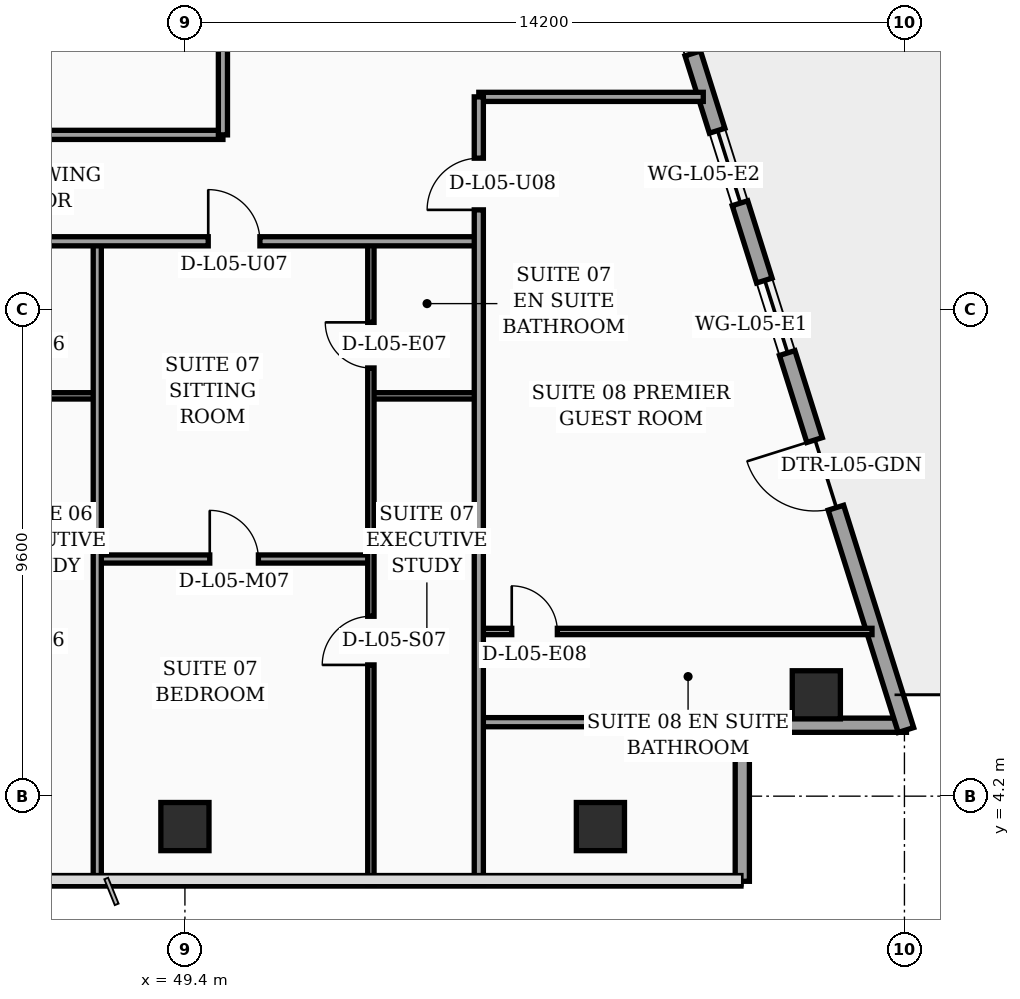
"""IFC4 building model, lengths in metres.
Left out: names, types, materials, properties, quantities, classifications, styles, units other than length and angle.
Written with IfcOpenShell. Run it as: python <this file> out.ifc"""

import sys

from ifc_helpers import new_model, si_unit, direction, frame, frame_2d, origin, origin_2d, place, context, subcontext, project, spatial, rectangle, hollow_rectangle, extrude, element, fill, save


model = new_model("IFC4")
c1 = context("Model", 3, precision=1e-05, world=origin(), true_north=direction((0.0, 1.0)))
c2 = subcontext(c1, "Body", "Model", "MODEL_VIEW")
j1 = project(units=[si_unit("LENGTHUNIT", "METRE"), si_unit("PLANEANGLEUNIT", "RADIAN")], contexts=[c1])
p1 = place(None, origin())
s1 = spatial("IfcSite", under=j1, at=p1, CompositionType="ELEMENT")
p2 = place(p1, origin())
s2 = spatial("IfcBuilding", under=s1, at=p2, CompositionType="ELEMENT")
p3 = place(p2, frame((0.0, 0.0, 27.0)))
s3 = spatial("IfcBuildingStorey", under=s2, at=p3, CompositionType="ELEMENT", Elevation=27.0)
for number, where, z_axis, x_axis in (
    (1, (49.4, 3.6, 0.0), (0.0, 0.0, 1.0), (1.0, 0.0, 0.0)),
    (2, (57.6, 3.6, 0.0), (0.0, 0.0, 1.0), (1.0, 0.0, 0.0)),
    (3, (61.861, 6.2, 0.0), (0.0, 0.0, 1.0), (1.0, 0.0, 0.0)),
):
    element("IfcColumn", number, at=place(p3, frame(where, z_axis=z_axis, x_axis=x_axis)), inside=s3, PredefinedType="COLUMN", context=c2, shape_type="SweptSolid", body=[
        extrude(hollow_rectangle(XDim=0.95, YDim=0.95, WallThickness=0.04, at=origin_2d()), origin(), (0.0, 0.0, 1.0), 3.56),
    ])
p4 = place(p3, frame((60.4, 2.52, 0.0), z_axis=(0.0, 0.0, 1.0), x_axis=(0.0, 1.0, 0.0)))
e4 = element("IfcWall", 4, at=p4, inside=s3, PredefinedType="SOLIDWALL", context=c2, shape_type="SweptSolid", body=[
    extrude(rectangle(XDim=2.94, YDim=0.28, at=frame_2d((1.47, 0.0))), origin(), (0.0, 0.0, 1.0), 3.04),
])
p5 = place(p3, frame((60.26, 5.6, 0.0), z_axis=(0.0, 0.0, 1.0), x_axis=(1.0, 0.0, 0.0)))
e5 = element("IfcWall", 5, at=p5, inside=s3, PredefinedType="SOLIDWALL", context=c2, shape_type="SweptSolid", body=[
    extrude(rectangle(XDim=3.38, YDim=0.28, at=frame_2d((1.69, 0.0))), origin(), (0.0, 0.0, 1.0), 3.04),
])
p6 = place(p3, frame((63.63, 5.505, 0.0), z_axis=(0.0, 0.0, 1.0), x_axis=(-0.300501856448, 0.953781229775, 0.0)))
e6 = element("IfcWall", 6, at=p6, inside=s3, PredefinedType="SOLIDWALL", context=c2, shape_type="SweptSolid", body=[
    extrude(rectangle(XDim=30.814, YDim=0.32, at=frame_2d((15.407, 0.0))), origin(), (0.0, 0.0, 1.0), 3.56),
])
p7 = place(p6, frame((4.6, 0.0, 0.0)))
e7 = element("IfcOpeningElement", 7, at=p7, cuts=e6, PredefinedType="OPENING", context=c2, shape_type="SweptSolid", body=[
    extrude(rectangle(XDim=1.4, YDim=2.25, at=frame_2d((0.7, 1.125))), frame((0.0, 0.17, 0.0), z_axis=(0.0, -1.0, 0.0), x_axis=(1.0, 0.0, 0.0)), (0.0, 0.0, 1.0), 0.34),
])
p8 = place(p6, frame((7.8, 0.0, 0.75)))
e8 = element("IfcOpeningElement", 8, at=p8, cuts=e6, PredefinedType="OPENING", context=c2, shape_type="SweptSolid", body=[
    extrude(rectangle(XDim=1.5, YDim=1.6, at=frame_2d((0.75, 0.8))), frame((0.0, 0.17, 0.0), z_axis=(0.0, -1.0, 0.0), x_axis=(1.0, 0.0, 0.0)), (0.0, 0.0, 1.0), 0.34),
])
p9 = place(p6, frame((10.9, 0.0, 0.75)))
e9 = element("IfcOpeningElement", 9, at=p9, cuts=e6, PredefinedType="OPENING", context=c2, shape_type="SweptSolid", body=[
    extrude(rectangle(XDim=1.5, YDim=1.6, at=frame_2d((0.75, 0.8))), frame((0.0, 0.17, 0.0), z_axis=(0.0, -1.0, 0.0), x_axis=(1.0, 0.0, 0.0)), (0.0, 0.0, 1.0), 0.34),
])
p10 = place(p6, frame((14.0, 0.0, 0.75)))
e10 = element("IfcOpeningElement", 10, at=p10, cuts=e6, PredefinedType="OPENING", context=c2, shape_type="SweptSolid", body=[
    extrude(rectangle(XDim=1.5, YDim=1.6, at=frame_2d((0.75, 0.8))), frame((0.0, 0.17, 0.0), z_axis=(0.0, -1.0, 0.0), x_axis=(1.0, 0.0, 0.0)), (0.0, 0.0, 1.0), 0.34),
])
p11 = place(p6, frame((17.1, 0.0, 0.75)))
e11 = element("IfcOpeningElement", 11, at=p11, cuts=e6, PredefinedType="OPENING", context=c2, shape_type="SweptSolid", body=[
    extrude(rectangle(XDim=1.5, YDim=1.6, at=frame_2d((0.75, 0.8))), frame((0.0, 0.17, 0.0), z_axis=(0.0, -1.0, 0.0), x_axis=(1.0, 0.0, 0.0)), (0.0, 0.0, 1.0), 0.34),
])
p12 = place(p6, frame((20.2, 0.0, 0.75)))
e12 = element("IfcOpeningElement", 12, at=p12, cuts=e6, PredefinedType="OPENING", context=c2, shape_type="SweptSolid", body=[
    extrude(rectangle(XDim=1.5, YDim=1.6, at=frame_2d((0.75, 0.8))), frame((0.0, 0.17, 0.0), z_axis=(0.0, -1.0, 0.0), x_axis=(1.0, 0.0, 0.0)), (0.0, 0.0, 1.0), 0.34),
])
p13 = place(p6, frame((23.3, 0.0, 0.75)))
e13 = element("IfcOpeningElement", 13, at=p13, cuts=e6, PredefinedType="OPENING", context=c2, shape_type="SweptSolid", body=[
    extrude(rectangle(XDim=1.5, YDim=1.6, at=frame_2d((0.75, 0.8))), frame((0.0, 0.17, 0.0), z_axis=(0.0, -1.0, 0.0), x_axis=(1.0, 0.0, 0.0)), (0.0, 0.0, 1.0), 0.34),
])
p14 = place(p6, frame((26.4, 0.0, 0.75)))
e14 = element("IfcOpeningElement", 14, at=p14, cuts=e6, PredefinedType="OPENING", context=c2, shape_type="SweptSolid", body=[
    extrude(rectangle(XDim=1.5, YDim=1.6, at=frame_2d((0.75, 0.8))), frame((0.0, 0.17, 0.0), z_axis=(0.0, -1.0, 0.0), x_axis=(1.0, 0.0, 0.0)), (0.0, 0.0, 1.0), 0.34),
])
p15 = place(p3, frame((45.54, 12.1, 0.0), z_axis=(0.0, 0.0, 1.0), x_axis=(1.0, 0.0, 0.0)))
e15 = element("IfcWall", 15, at=p15, inside=s3, PredefinedType="PARTITIONING", context=c2, shape_type="SweptSolid", body=[
    extrude(rectangle(XDim=2.13, YDim=0.125, at=frame_2d((1.065, 0.0))), origin(), (0.0, 0.0, 1.0), 2.84),
])
p16 = place(p3, frame((53.07, 12.1, 0.0), z_axis=(0.0, 0.0, 1.0), x_axis=(1.0, 0.0, 0.0)))
e16 = element("IfcWall", 16, at=p16, inside=s3, PredefinedType="PARTITIONING", context=c2, shape_type="SweptSolid", body=[
    extrude(rectangle(XDim=2.13, YDim=0.125, at=frame_2d((1.065, 0.0))), origin(), (0.0, 0.0, 1.0), 3.56),
])
p17 = place(p3, frame((47.67, 8.88, 0.0), z_axis=(0.0, 0.0, 1.0), x_axis=(1.0, 0.0, 0.0)))
e17 = element("IfcWall", 17, at=p17, inside=s3, PredefinedType="PARTITIONING", context=c2, shape_type="SweptSolid", body=[
    extrude(rectangle(XDim=5.4, YDim=0.16, at=frame_2d((2.7, 0.0))), origin(), (0.0, 0.0, 1.0), 2.84),
])
p18 = place(p17, frame((2.22, 0.0, 0.0)))
e18 = element("IfcOpeningElement", 18, at=p18, cuts=e17, PredefinedType="OPENING", context=c2, shape_type="SweptSolid", body=[
    extrude(rectangle(XDim=0.96, YDim=2.2, at=frame_2d((0.48, 1.1))), frame((0.0, 0.09, 0.0), z_axis=(0.0, -1.0, 0.0), x_axis=(1.0, 0.0, 0.0)), (0.0, 0.0, 1.0), 0.18),
])
p19 = place(p3, frame((53.07, 2.44, 0.0), z_axis=(0.0, 0.0, 1.0), x_axis=(0.0, 1.0, 0.0)))
e19 = element("IfcWall", 19, at=p19, inside=s3, PredefinedType="PARTITIONING", context=c2, shape_type="SweptSolid", body=[
    extrude(rectangle(XDim=12.71, YDim=0.125, at=frame_2d((6.355, 0.0))), origin(), (0.0, 0.0, 1.0), 3.04),
])
p20 = place(p19, frame((4.35, 0.0, 0.0)))
e20 = element("IfcOpeningElement", 20, at=p20, cuts=e19, PredefinedType="OPENING", context=c2, shape_type="SweptSolid", body=[
    extrude(rectangle(XDim=0.96, YDim=2.2, at=frame_2d((0.48, 1.1))), frame((0.0, 0.073, 0.0), z_axis=(0.0, -1.0, 0.0), x_axis=(1.0, 0.0, 0.0)), (0.0, 0.0, 1.0), 0.145),
])
p21 = place(p19, frame((10.21, 0.0, 0.0)))
e21 = element("IfcOpeningElement", 21, at=p21, cuts=e19, PredefinedType="OPENING", context=c2, shape_type="SweptSolid", body=[
    extrude(rectangle(XDim=0.9, YDim=2.15, at=frame_2d((0.45, 1.075))), frame((0.0, 0.073, 0.0), z_axis=(0.0, -1.0, 0.0), x_axis=(1.0, 0.0, 0.0)), (0.0, 0.0, 1.0), 0.145),
])
p22 = place(p3, frame((47.67, 2.44, 0.0), z_axis=(0.0, 0.0, 1.0), x_axis=(0.0, 1.0, 0.0)))
e22 = element("IfcWall", 22, at=p22, inside=s3, PredefinedType="PARTITIONING", context=c2, shape_type="SweptSolid", body=[
    extrude(rectangle(XDim=12.71, YDim=0.16, at=frame_2d((6.355, 0.0))), origin(), (0.0, 0.0, 1.0), 2.84),
])
p23 = place(p3, frame((32.4, 15.15, 0.0), z_axis=(0.0, 0.0, 1.0), x_axis=(1.0, 0.0, 0.0)))
e23 = element("IfcWall", 23, at=p23, inside=s3, PredefinedType="PARTITIONING", context=c2, shape_type="SweptSolid", body=[
    extrude(rectangle(XDim=22.8, YDim=0.18, at=frame_2d((11.4, 0.0))), origin(), (0.0, 0.0, 1.0), 2.84),
])
p24 = place(p23, frame((2.07, 0.0, 0.0)))
e24 = element("IfcOpeningElement", 24, at=p24, cuts=e23, PredefinedType="OPENING", context=c2, shape_type="SweptSolid", body=[
    extrude(rectangle(XDim=1.02, YDim=2.2, at=frame_2d((0.51, 1.1))), frame((0.0, 0.1, 0.0), z_axis=(0.0, -1.0, 0.0), x_axis=(1.0, 0.0, 0.0)), (0.0, 0.0, 1.0), 0.2),
])
p25 = place(p23, frame((9.5, 0.0, 0.0)))
e25 = element("IfcOpeningElement", 25, at=p25, cuts=e23, PredefinedType="OPENING", context=c2, shape_type="SweptSolid", body=[
    extrude(rectangle(XDim=1.02, YDim=2.2, at=frame_2d((0.51, 1.1))), frame((0.0, 0.1, 0.0), z_axis=(0.0, -1.0, 0.0), x_axis=(1.0, 0.0, 0.0)), (0.0, 0.0, 1.0), 0.2),
])
p26 = place(p23, frame((17.46, 0.0, 0.0)))
e26 = element("IfcOpeningElement", 26, at=p26, cuts=e23, PredefinedType="OPENING", context=c2, shape_type="SweptSolid", body=[
    extrude(rectangle(XDim=1.02, YDim=2.2, at=frame_2d((0.51, 1.1))), frame((0.0, 0.1, 0.0), z_axis=(0.0, -1.0, 0.0), x_axis=(1.0, 0.0, 0.0)), (0.0, 0.0, 1.0), 0.2),
])
p27 = place(p3, frame((21.5, 17.25, 0.0), z_axis=(0.0, 0.0, 1.0), x_axis=(1.0, 0.0, 0.0)))
e27 = element("IfcWall", 27, at=p27, inside=s3, PredefinedType="PARTITIONING", context=c2, shape_type="SweptSolid", body=[
    extrude(rectangle(XDim=28.65, YDim=0.18, at=frame_2d((14.325, 0.0))), origin(), (0.0, 0.0, 1.0), 2.84),
])
p28 = place(p27, frame((0.95, 0.0, 0.0)))
e28 = element("IfcOpeningElement", 28, at=p28, cuts=e27, PredefinedType="OPENING", context=c2, shape_type="SweptSolid", body=[
    extrude(rectangle(XDim=1.02, YDim=2.2, at=frame_2d((0.51, 1.1))), frame((0.0, 0.1, 0.0), z_axis=(0.0, -1.0, 0.0), x_axis=(1.0, 0.0, 0.0)), (0.0, 0.0, 1.0), 0.2),
])
p29 = place(p27, frame((15.23, 0.0, 0.0)))
e29 = element("IfcOpeningElement", 29, at=p29, cuts=e27, PredefinedType="OPENING", context=c2, shape_type="SweptSolid", body=[
    extrude(rectangle(XDim=1.02, YDim=2.2, at=frame_2d((0.51, 1.1))), frame((0.0, 0.1, 0.0), z_axis=(0.0, -1.0, 0.0), x_axis=(1.0, 0.0, 0.0)), (0.0, 0.0, 1.0), 0.2),
])
p30 = place(p3, frame((50.15, 17.25, 0.0), z_axis=(0.0, 0.0, 1.0), x_axis=(0.0, 1.0, 0.0)))
e30 = element("IfcWall", 30, at=p30, inside=s3, PredefinedType="PARTITIONING", context=c2, shape_type="SweptSolid", body=[
    extrude(rectangle(XDim=20.71, YDim=0.18, at=frame_2d((10.355, 0.0))), origin(), (0.0, 0.0, 1.0), 2.84),
])
p31 = place(p3, frame((55.2, 7.45, 0.0), z_axis=(0.0, 0.0, 1.0), x_axis=(1.0, 0.0, 0.0)))
e31 = element("IfcWall", 31, at=p31, inside=s3, PredefinedType="PARTITIONING", context=c2, shape_type="SweptSolid", body=[
    extrude(rectangle(XDim=7.76, YDim=0.125, at=frame_2d((3.88, 0.0))), origin(), (0.0, 0.0, 1.0), 3.04),
])
p32 = place(p31, frame((0.65, 0.0, 0.0)))
e32 = element("IfcOpeningElement", 32, at=p32, cuts=e31, PredefinedType="OPENING", context=c2, shape_type="SweptSolid", body=[
    extrude(rectangle(XDim=0.9, YDim=2.15, at=frame_2d((0.45, 1.075))), frame((0.0, 0.073, 0.0), z_axis=(0.0, -1.0, 0.0), x_axis=(1.0, 0.0, 0.0)), (0.0, 0.0, 1.0), 0.145),
])
p33 = place(p3, frame((55.2, 5.66, 0.0), z_axis=(0.0, 0.0, 1.0), x_axis=(1.0, 0.0, 0.0)))
e33 = element("IfcWall", 33, at=p33, inside=s3, PredefinedType="PARTITIONING", context=c2, shape_type="SweptSolid", body=[
    extrude(rectangle(XDim=5.2, YDim=0.18, at=frame_2d((2.6, 0.0))), origin(), (0.0, 0.0, 1.0), 3.04),
])
p34 = place(p3, frame((55.2, 18.0, 0.0), z_axis=(0.0, 0.0, 1.0), x_axis=(1.0, 0.0, 0.0)))
e34 = element("IfcWall", 34, at=p34, inside=s3, PredefinedType="PARTITIONING", context=c2, shape_type="SweptSolid", body=[
    extrude(rectangle(XDim=4.43, YDim=0.18, at=frame_2d((2.215, 0.0))), origin(), (0.0, 0.0, 1.0), 3.04),
])
p35 = place(p3, frame((55.2, 2.44, 0.0), z_axis=(0.0, 0.0, 1.0), x_axis=(0.0, 1.0, 0.0)))
e35 = element("IfcWall", 35, at=p35, inside=s3, PredefinedType="PARTITIONING", context=c2, shape_type="SweptSolid", body=[
    extrude(rectangle(XDim=15.56, YDim=0.18, at=frame_2d((7.78, 0.0))), origin(), (0.0, 0.0, 1.0), 3.04),
])
p36 = place(p35, frame((13.33, 0.0, 0.0)))
e36 = element("IfcOpeningElement", 36, at=p36, cuts=e35, PredefinedType="OPENING", context=c2, shape_type="SweptSolid", body=[
    extrude(rectangle(XDim=1.02, YDim=2.2, at=frame_2d((0.51, 1.1))), frame((0.0, 0.1, 0.0), z_axis=(0.0, -1.0, 0.0), x_axis=(1.0, 0.0, 0.0)), (0.0, 0.0, 1.0), 0.2),
])
p37 = place(p7, origin())
e37 = element("IfcDoor", 37, at=p37, inside=s3, OperationType="SINGLE_SWING_RIGHT", PredefinedType="DOOR", context=c2, shape_type="SweptSolid", body=[
    extrude(rectangle(XDim=1.4, YDim=2.25, at=frame_2d((0.7, 1.125))), frame((0.0, 0.025, 0.0), z_axis=(0.0, -1.0, 0.0), x_axis=(1.0, 0.0, 0.0)), (0.0, 0.0, 1.0), 0.05),
])
fill(e7, e37)
p38 = place(p8, origin())
e38 = element("IfcWindow", 38, at=p38, inside=s3, PartitioningType="SINGLE_PANEL", PredefinedType="WINDOW", context=c2, shape_type="SweptSolid", body=[
    extrude(rectangle(XDim=1.5, YDim=1.6, at=frame_2d((0.75, 0.8))), frame((0.0, 0.03, 0.0), z_axis=(0.0, -1.0, 0.0), x_axis=(1.0, 0.0, 0.0)), (0.0, 0.0, 1.0), 0.06),
])
fill(e8, e38)
p39 = place(p9, origin())
e39 = element("IfcWindow", 39, at=p39, inside=s3, PartitioningType="SINGLE_PANEL", PredefinedType="WINDOW", context=c2, shape_type="SweptSolid", body=[
    extrude(rectangle(XDim=1.5, YDim=1.6, at=frame_2d((0.75, 0.8))), frame((0.0, 0.03, 0.0), z_axis=(0.0, -1.0, 0.0), x_axis=(1.0, 0.0, 0.0)), (0.0, 0.0, 1.0), 0.06),
])
fill(e9, e39)
p40 = place(p10, origin())
e40 = element("IfcWindow", 40, at=p40, inside=s3, PartitioningType="SINGLE_PANEL", PredefinedType="WINDOW", context=c2, shape_type="SweptSolid", body=[
    extrude(rectangle(XDim=1.5, YDim=1.6, at=frame_2d((0.75, 0.8))), frame((0.0, 0.03, 0.0), z_axis=(0.0, -1.0, 0.0), x_axis=(1.0, 0.0, 0.0)), (0.0, 0.0, 1.0), 0.06),
])
fill(e10, e40)
p41 = place(p18, origin())
e41 = element("IfcDoor", 41, at=p41, inside=s3, OperationType="SINGLE_SWING_LEFT", PredefinedType="DOOR", context=c2, shape_type="SweptSolid", body=[
    extrude(rectangle(XDim=0.96, YDim=2.2, at=frame_2d((0.48, 1.1))), frame((0.0, 0.025, 0.0), z_axis=(0.0, -1.0, 0.0), x_axis=(1.0, 0.0, 0.0)), (0.0, 0.0, 1.0), 0.05),
])
fill(e18, e41)
p42 = place(p20, origin())
e42 = element("IfcDoor", 42, at=p42, inside=s3, OperationType="SINGLE_SWING_LEFT", PredefinedType="DOOR", context=c2, shape_type="SweptSolid", body=[
    extrude(rectangle(XDim=0.96, YDim=2.2, at=frame_2d((0.48, 1.1))), frame((0.0, 0.025, 0.0), z_axis=(0.0, -1.0, 0.0), x_axis=(1.0, 0.0, 0.0)), (0.0, 0.0, 1.0), 0.05),
])
fill(e20, e42)
p43 = place(p21, origin())
e43 = element("IfcDoor", 43, at=p43, inside=s3, OperationType="SINGLE_SWING_RIGHT", PredefinedType="DOOR", context=c2, shape_type="SweptSolid", body=[
    extrude(rectangle(XDim=0.9, YDim=2.15, at=frame_2d((0.45, 1.075))), frame((0.0, 0.025, 0.0), z_axis=(0.0, -1.0, 0.0), x_axis=(1.0, 0.0, 0.0)), (0.0, 0.0, 1.0), 0.05),
])
fill(e21, e43)
p44 = place(p26, origin())
e44 = element("IfcDoor", 44, at=p44, inside=s3, OperationType="SINGLE_SWING_LEFT", PredefinedType="DOOR", context=c2, shape_type="SweptSolid", body=[
    extrude(rectangle(XDim=1.02, YDim=2.2, at=frame_2d((0.51, 1.1))), frame((0.0, 0.025, 0.0), z_axis=(0.0, -1.0, 0.0), x_axis=(1.0, 0.0, 0.0)), (0.0, 0.0, 1.0), 0.05),
])
fill(e26, e44)
p45 = place(p32, origin())
e45 = element("IfcDoor", 45, at=p45, inside=s3, OperationType="SINGLE_SWING_LEFT", PredefinedType="DOOR", context=c2, shape_type="SweptSolid", body=[
    extrude(rectangle(XDim=0.9, YDim=2.15, at=frame_2d((0.45, 1.075))), frame((0.0, 0.025, 0.0), z_axis=(0.0, -1.0, 0.0), x_axis=(1.0, 0.0, 0.0)), (0.0, 0.0, 1.0), 0.05),
])
fill(e32, e45)
p46 = place(p36, origin())
e46 = element("IfcDoor", 46, at=p46, inside=s3, OperationType="SINGLE_SWING_LEFT", PredefinedType="DOOR", context=c2, shape_type="SweptSolid", body=[
    extrude(rectangle(XDim=1.02, YDim=2.2, at=frame_2d((0.51, 1.1))), frame((0.0, 0.025, 0.0), z_axis=(0.0, -1.0, 0.0), x_axis=(1.0, 0.0, 0.0)), (0.0, 0.0, 1.0), 0.05),
])
fill(e36, e46)
save(model, sys.argv[1])
